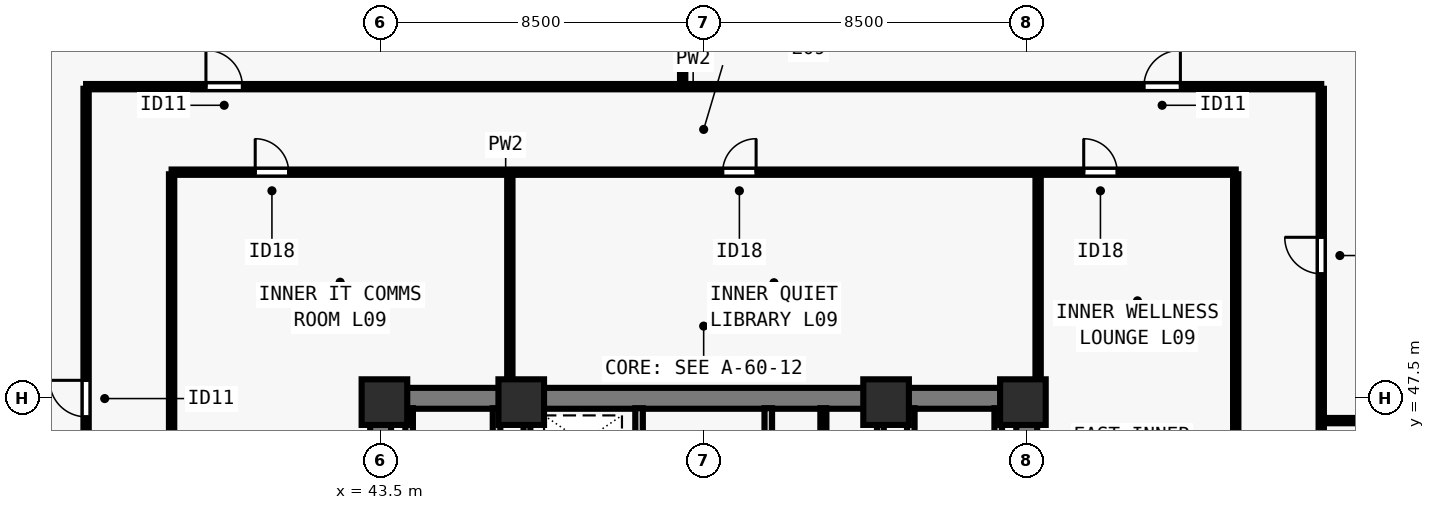
"""IFC4 building model, lengths in metres.
Left out: names, types, materials, properties, quantities, classifications, styles, units other than length and angle.
Written with IfcOpenShell. Run it as: python <this file> out.ifc"""

import sys

from ifc_helpers import new_model, si_unit, direction, frame, frame_2d, origin, origin_2d, place, context, subcontext, project, spatial, rectangle, extrude, element, fill, save


model = new_model("IFC4")
c1 = context("Model", 3, precision=1e-05, world=origin(), true_north=direction((0.0, 1.0)))
c2 = subcontext(c1, "Body", "Model", "MODEL_VIEW")
j1 = project(units=[si_unit("LENGTHUNIT", "METRE"), si_unit("PLANEANGLEUNIT", "RADIAN")], contexts=[c1])
p1 = place(None, origin())
s1 = spatial("IfcSite", under=j1, at=p1, CompositionType="ELEMENT")
p2 = place(p1, origin())
s2 = spatial("IfcBuilding", under=s1, at=p2, CompositionType="ELEMENT")
p3 = place(p2, frame((0.0, 0.0, 37.5)))
s3 = spatial("IfcBuildingStorey", under=s2, at=p3, CompositionType="ELEMENT", Elevation=37.5)
for number, where, z_axis, x_axis in (
    (1, (43.6, 47.4, 0.0), (0.0, 0.0, 1.0), (1.0, 0.0, 0.0)),
    (2, (47.2, 47.4, 0.0), (0.0, 0.0, 1.0), (1.0, 0.0, 0.0)),
    (3, (56.8, 47.4, 0.0), (0.0, 0.0, 1.0), (1.0, 0.0, 0.0)),
    (4, (60.4, 47.4, 0.0), (0.0, 0.0, 1.0), (1.0, 0.0, 0.0)),
):
    element("IfcColumn", number, at=place(p3, frame(where, z_axis=z_axis, x_axis=x_axis)), inside=s3, PredefinedType="COLUMN", context=c2, shape_type="SweptSolid", body=[
        extrude(rectangle(XDim=1.2, YDim=1.2, at=origin_2d()), origin(), (0.0, 0.0, 1.0), 3.5),
    ])
p4 = place(p3, frame((43.225, 47.5, 0.0), z_axis=(0.0, 0.0, 1.0), x_axis=(1.0, 0.0, 0.0)))
e5 = element("IfcWall", 5, at=p4, inside=s3, PredefinedType="SHEAR", context=c2, shape_type="SweptSolid", body=[
    extrude(rectangle(XDim=17.55, YDim=0.55, at=frame_2d((8.775, 0.0))), origin(), (0.0, 0.0, 1.0), 3.28),
])
for number, where, z_axis, x_axis in (
    (6, (43.5, 40.8, 0.0), (0.0, 0.0, 1.0), (0.0, 1.0, 0.0)),
    (7, (60.5, 40.8, 0.0), (0.0, 0.0, 1.0), (0.0, 1.0, 0.0)),
):
    element("IfcWall", number, at=place(p3, frame(where, z_axis=z_axis, x_axis=x_axis)), inside=s3, PredefinedType="SHEAR", context=c2, shape_type="SweptSolid", body=[
        extrude(rectangle(XDim=6.435, YDim=0.55, at=frame_2d((3.218, 0.0))), origin(), (0.0, 0.0, 1.0), 3.28),
    ])
p5 = place(p3, frame((50.3, 40.585, 0.0), z_axis=(0.0, 0.0, 1.0), x_axis=(0.0, 1.0, 0.0)))
e8 = element("IfcWall", 8, at=p5, inside=s3, PredefinedType="SOLIDWALL", context=c2, shape_type="SweptSolid", body=[
    extrude(rectangle(XDim=6.655, YDim=0.2, at=frame_2d((3.328, 0.0))), origin(), (0.0, 0.0, 1.0), 3.28),
])
p6 = place(p5, frame((5.065, 0.0, 0.0)))
e9 = element("IfcOpeningElement", 9, at=p6, cuts=e8, PredefinedType="OPENING", context=c2, shape_type="SweptSolid", body=[
    extrude(rectangle(XDim=0.8, YDim=2.08, at=frame_2d((0.4, 1.04))), frame((0.0, 0.11, 0.0), z_axis=(0.0, -1.0, 0.0), x_axis=(1.0, 0.0, 0.0)), (0.0, 0.0, 1.0), 0.22),
])
p7 = place(p3, frame((53.7, 40.585, 0.0), z_axis=(0.0, 0.0, 1.0), x_axis=(0.0, 1.0, 0.0)))
e10 = element("IfcWall", 10, at=p7, inside=s3, PredefinedType="SOLIDWALL", context=c2, shape_type="SweptSolid", body=[
    extrude(rectangle(XDim=6.655, YDim=0.2, at=frame_2d((3.328, 0.0))), origin(), (0.0, 0.0, 1.0), 3.28),
])
p8 = place(p7, frame((0.195, 0.0, 0.0)))
e11 = element("IfcOpeningElement", 11, at=p8, cuts=e10, PredefinedType="OPENING", context=c2, shape_type="SweptSolid", body=[
    extrude(rectangle(XDim=0.8, YDim=2.08, at=frame_2d((0.4, 1.04))), frame((0.0, 0.11, 0.0), z_axis=(0.0, -1.0, 0.0), x_axis=(1.0, 0.0, 0.0)), (0.0, 0.0, 1.0), 0.22),
])
p9 = place(p7, frame((4.265, 0.0, 0.0)))
e12 = element("IfcOpeningElement", 12, at=p9, cuts=e10, PredefinedType="OPENING", context=c2, shape_type="SweptSolid", body=[
    extrude(rectangle(XDim=0.95, YDim=2.12, at=frame_2d((0.475, 1.06))), frame((0.0, 0.11, 0.0), z_axis=(0.0, -1.0, 0.0), x_axis=(1.0, 0.0, 0.0)), (0.0, 0.0, 1.0), 0.22),
])
for number, where, z_axis, x_axis in (
    (13, (46.55, 43.735, 0.0), (0.0, 0.0, 1.0), (0.0, 1.0, 0.0)),
    (14, (44.25, 43.735, 0.0), (0.0, 0.0, 1.0), (0.0, 1.0, 0.0)),
    (15, (57.45, 43.735, 0.0), (0.0, 0.0, 1.0), (0.0, 1.0, 0.0)),
    (16, (59.75, 43.735, 0.0), (0.0, 0.0, 1.0), (0.0, 1.0, 0.0)),
):
    element("IfcWall", number, at=place(p3, frame(where, z_axis=z_axis, x_axis=x_axis)), inside=s3, PredefinedType="SOLIDWALL", context=c2, shape_type="SweptSolid", body=[
        extrude(rectangle(XDim=3.505, YDim=0.2, at=frame_2d((1.752, 0.0))), origin(), (0.0, 0.0, 1.0), 3.28),
    ])
for number, where, z_axis, x_axis in (
    (17, (47.35, 43.735, 0.0), (0.0, 0.0, 1.0), (0.0, 1.0, 0.0)),
    (18, (56.65, 43.735, 0.0), (0.0, 0.0, 1.0), (0.0, 1.0, 0.0)),
):
    element("IfcWall", number, at=place(p3, frame(where, z_axis=z_axis, x_axis=x_axis)), inside=s3, PredefinedType="SOLIDWALL", context=c2, shape_type="SweptSolid", body=[
        extrude(rectangle(XDim=3.505, YDim=0.18, at=frame_2d((1.752, 0.0))), origin(), (0.0, 0.0, 1.0), 3.28),
    ])
p10 = place(p3, frame((55.15, 44.195, 0.0), z_axis=(0.0, 0.0, 1.0), x_axis=(0.0, 1.0, 0.0)))
e19 = element("IfcWall", 19, at=p10, inside=s3, PredefinedType="PARTITIONING", context=c2, shape_type="SweptSolid", body=[
    extrude(rectangle(XDim=3.045, YDim=0.16, at=frame_2d((1.522, 0.0))), origin(), (0.0, 0.0, 1.0), 3.28),
])
p11 = place(p10, frame((1.025, 0.0, 0.0)))
e20 = element("IfcOpeningElement", 20, at=p11, cuts=e19, PredefinedType="OPENING", context=c2, shape_type="SweptSolid", body=[
    extrude(rectangle(XDim=0.8, YDim=2.1, at=frame_2d((0.4, 1.05))), frame((0.0, 0.09, 0.0), z_axis=(0.0, -1.0, 0.0), x_axis=(1.0, 0.0, 0.0)), (0.0, 0.0, 1.0), 0.18),
])
p12 = place(p3, frame((35.75, 55.7, 0.0), z_axis=(0.0, 0.0, 1.0), x_axis=(1.0, 0.0, 0.0)))
e21 = element("IfcWall", 21, at=p12, inside=s3, PredefinedType="PARTITIONING", context=c2, shape_type="SweptSolid", body=[
    extrude(rectangle(XDim=32.5, YDim=0.14, at=frame_2d((16.25, 0.0))), origin(), (0.0, 0.0, 1.0), 3.28),
])
p13 = place(p12, frame((3.154, 0.0, 0.0)))
e22 = element("IfcOpeningElement", 22, at=p13, cuts=e21, PredefinedType="OPENING", context=c2, shape_type="SweptSolid", body=[
    extrude(rectangle(XDim=0.96, YDim=2.12, at=frame_2d((0.48, 1.06))), frame((0.0, 0.08, 0.0), z_axis=(0.0, -1.0, 0.0), x_axis=(1.0, 0.0, 0.0)), (0.0, 0.0, 1.0), 0.16),
])
p14 = place(p12, frame((27.834, 0.0, 0.0)))
e23 = element("IfcOpeningElement", 23, at=p14, cuts=e21, PredefinedType="OPENING", context=c2, shape_type="SweptSolid", body=[
    extrude(rectangle(XDim=0.96, YDim=2.12, at=frame_2d((0.48, 1.06))), frame((0.0, 0.08, 0.0), z_axis=(0.0, -1.0, 0.0), x_axis=(1.0, 0.0, 0.0)), (0.0, 0.0, 1.0), 0.16),
])
p15 = place(p3, frame((35.75, 22.355, 0.0), z_axis=(0.0, 0.0, 1.0), x_axis=(0.0, 1.0, 0.0)))
e24 = element("IfcWall", 24, at=p15, inside=s3, PredefinedType="PARTITIONING", context=c2, shape_type="SweptSolid", body=[
    extrude(rectangle(XDim=33.29, YDim=0.14, at=frame_2d((16.645, 0.0))), origin(), (0.0, 0.0, 1.0), 3.28),
])
p16 = place(p15, frame((8.058, 0.0, 0.0)))
e25 = element("IfcOpeningElement", 25, at=p16, cuts=e24, PredefinedType="OPENING", context=c2, shape_type="SweptSolid", body=[
    extrude(rectangle(XDim=0.96, YDim=2.12, at=frame_2d((0.48, 1.06))), frame((0.0, 0.08, 0.0), z_axis=(0.0, -1.0, 0.0), x_axis=(1.0, 0.0, 0.0)), (0.0, 0.0, 1.0), 0.16),
])
p17 = place(p15, frame((24.658, 0.0, 0.0)))
e26 = element("IfcOpeningElement", 26, at=p17, cuts=e24, PredefinedType="OPENING", context=c2, shape_type="SweptSolid", body=[
    extrude(rectangle(XDim=0.96, YDim=2.12, at=frame_2d((0.48, 1.06))), frame((0.0, 0.08, 0.0), z_axis=(0.0, -1.0, 0.0), x_axis=(1.0, 0.0, 0.0)), (0.0, 0.0, 1.0), 0.16),
])
p18 = place(p3, frame((68.25, 22.355, 0.0), z_axis=(0.0, 0.0, 1.0), x_axis=(0.0, 1.0, 0.0)))
e27 = element("IfcWall", 27, at=p18, inside=s3, PredefinedType="PARTITIONING", context=c2, shape_type="SweptSolid", body=[
    extrude(rectangle(XDim=33.29, YDim=0.14, at=frame_2d((16.645, 0.0))), origin(), (0.0, 0.0, 1.0), 3.28),
])
p19 = place(p18, frame((3.522, 0.0, 0.0)))
e28 = element("IfcOpeningElement", 28, at=p19, cuts=e27, PredefinedType="OPENING", context=c2, shape_type="SweptSolid", body=[
    extrude(rectangle(XDim=0.96, YDim=2.12, at=frame_2d((0.48, 1.06))), frame((0.0, 0.08, 0.0), z_axis=(0.0, -1.0, 0.0), x_axis=(1.0, 0.0, 0.0)), (0.0, 0.0, 1.0), 0.16),
])
p20 = place(p18, frame((11.956, 0.0, 0.0)))
e29 = element("IfcOpeningElement", 29, at=p20, cuts=e27, PredefinedType="OPENING", context=c2, shape_type="SweptSolid", body=[
    extrude(rectangle(XDim=0.96, YDim=2.12, at=frame_2d((0.48, 1.06))), frame((0.0, 0.08, 0.0), z_axis=(0.0, -1.0, 0.0), x_axis=(1.0, 0.0, 0.0)), (0.0, 0.0, 1.0), 0.16),
])
p21 = place(p18, frame((20.256, 0.0, 0.0)))
e30 = element("IfcOpeningElement", 30, at=p21, cuts=e27, PredefinedType="OPENING", context=c2, shape_type="SweptSolid", body=[
    extrude(rectangle(XDim=0.96, YDim=2.12, at=frame_2d((0.48, 1.06))), frame((0.0, 0.08, 0.0), z_axis=(0.0, -1.0, 0.0), x_axis=(1.0, 0.0, 0.0)), (0.0, 0.0, 1.0), 0.16),
])
p22 = place(p18, frame((28.422, 0.0, 0.0)))
e31 = element("IfcOpeningElement", 31, at=p22, cuts=e27, PredefinedType="OPENING", context=c2, shape_type="SweptSolid", body=[
    extrude(rectangle(XDim=0.96, YDim=2.12, at=frame_2d((0.48, 1.06))), frame((0.0, 0.08, 0.0), z_axis=(0.0, -1.0, 0.0), x_axis=(1.0, 0.0, 0.0)), (0.0, 0.0, 1.0), 0.16),
])
p23 = place(p3, frame((38.0, 53.45, 0.0), z_axis=(0.0, 0.0, 1.0), x_axis=(1.0, 0.0, 0.0)))
e32 = element("IfcWall", 32, at=p23, inside=s3, PredefinedType="PARTITIONING", context=c2, shape_type="SweptSolid", body=[
    extrude(rectangle(XDim=28.0, YDim=0.14, at=frame_2d((14.0, 0.0))), origin(), (0.0, 0.0, 1.0), 3.28),
])
p24 = place(p23, frame((2.2, 0.0, 0.0)))
e33 = element("IfcOpeningElement", 33, at=p24, cuts=e32, PredefinedType="OPENING", context=c2, shape_type="SweptSolid", body=[
    extrude(rectangle(XDim=0.88, YDim=2.1, at=frame_2d((0.44, 1.05))), frame((0.0, 0.08, 0.0), z_axis=(0.0, -1.0, 0.0), x_axis=(1.0, 0.0, 0.0)), (0.0, 0.0, 1.0), 0.16),
])
p25 = place(p23, frame((14.5, 0.0, 0.0)))
e34 = element("IfcOpeningElement", 34, at=p25, cuts=e32, PredefinedType="OPENING", context=c2, shape_type="SweptSolid", body=[
    extrude(rectangle(XDim=0.88, YDim=2.1, at=frame_2d((0.44, 1.05))), frame((0.0, 0.08, 0.0), z_axis=(0.0, -1.0, 0.0), x_axis=(1.0, 0.0, 0.0)), (0.0, 0.0, 1.0), 0.16),
])
p26 = place(p23, frame((24.0, 0.0, 0.0)))
e35 = element("IfcOpeningElement", 35, at=p26, cuts=e32, PredefinedType="OPENING", context=c2, shape_type="SweptSolid", body=[
    extrude(rectangle(XDim=0.88, YDim=2.1, at=frame_2d((0.44, 1.05))), frame((0.0, 0.08, 0.0), z_axis=(0.0, -1.0, 0.0), x_axis=(1.0, 0.0, 0.0)), (0.0, 0.0, 1.0), 0.16),
])
p27 = place(p3, frame((38.0, 40.8, 0.0), z_axis=(0.0, 0.0, 1.0), x_axis=(0.0, 1.0, 0.0)))
e36 = element("IfcWall", 36, at=p27, inside=s3, PredefinedType="PARTITIONING", context=c2, shape_type="SweptSolid", body=[
    extrude(rectangle(XDim=12.595, YDim=0.14, at=frame_2d((6.297, 0.0))), origin(), (0.0, 0.0, 1.0), 3.28),
])
p28 = place(p27, frame((2.5, 0.0, 0.0)))
e37 = element("IfcOpeningElement", 37, at=p28, cuts=e36, PredefinedType="OPENING", context=c2, shape_type="SweptSolid", body=[
    extrude(rectangle(XDim=0.88, YDim=2.1, at=frame_2d((0.44, 1.05))), frame((0.0, 0.08, 0.0), z_axis=(0.0, -1.0, 0.0), x_axis=(1.0, 0.0, 0.0)), (0.0, 0.0, 1.0), 0.16),
])
p29 = place(p3, frame((66.0, 40.8, 0.0), z_axis=(0.0, 0.0, 1.0), x_axis=(0.0, 1.0, 0.0)))
e38 = element("IfcWall", 38, at=p29, inside=s3, PredefinedType="PARTITIONING", context=c2, shape_type="SweptSolid", body=[
    extrude(rectangle(XDim=12.595, YDim=0.14, at=frame_2d((6.297, 0.0))), origin(), (0.0, 0.0, 1.0), 3.28),
])
p30 = place(p29, frame((2.5, 0.0, 0.0)))
e39 = element("IfcOpeningElement", 39, at=p30, cuts=e38, PredefinedType="OPENING", context=c2, shape_type="SweptSolid", body=[
    extrude(rectangle(XDim=0.88, YDim=2.1, at=frame_2d((0.44, 1.05))), frame((0.0, 0.08, 0.0), z_axis=(0.0, -1.0, 0.0), x_axis=(1.0, 0.0, 0.0)), (0.0, 0.0, 1.0), 0.16),
])
p31 = place(p3, frame((46.9, 47.76, 0.0), z_axis=(0.0, 0.0, 1.0), x_axis=(0.0, 1.0, 0.0)))
e40 = element("IfcWall", 40, at=p31, inside=s3, PredefinedType="PARTITIONING", context=c2, shape_type="SweptSolid", body=[
    extrude(rectangle(XDim=5.635, YDim=0.14, at=frame_2d((2.817, 0.0))), origin(), (0.0, 0.0, 1.0), 3.28),
])
p32 = place(p3, frame((60.8, 47.76, 0.0), z_axis=(0.0, 0.0, 1.0), x_axis=(0.0, 1.0, 0.0)))
e41 = element("IfcWall", 41, at=p32, inside=s3, PredefinedType="PARTITIONING", context=c2, shape_type="SweptSolid", body=[
    extrude(rectangle(XDim=5.635, YDim=0.14, at=frame_2d((2.817, 0.0))), origin(), (0.0, 0.0, 1.0), 2.439),
])
p33 = place(p3, frame((51.448, 55.8, 0.0), z_axis=(0.0, 0.0, 1.0), x_axis=(0.0, 1.0, 0.0)))
e42 = element("IfcWall", 42, at=p33, inside=s3, PredefinedType="PARTITIONING", context=c2, shape_type="SweptSolid", body=[
    extrude(rectangle(XDim=8.28, YDim=0.14, at=frame_2d((4.14, 0.0))), origin(), (0.0, 0.0, 1.0), 3.28),
])
p34 = place(p3, frame((68.35, 46.913, 0.0), z_axis=(0.0, 0.0, 1.0), x_axis=(1.0, 0.0, 0.0)))
e43 = element("IfcWall", 43, at=p34, inside=s3, PredefinedType="PARTITIONING", context=c2, shape_type="SweptSolid", body=[
    extrude(rectangle(XDim=8.73, YDim=0.14, at=frame_2d((4.365, 0.0))), origin(), (0.0, 0.0, 1.0), 3.28),
])
p35 = place(p24, origin())
e44 = element("IfcDoor", 44, at=p35, inside=s3, OperationType="SINGLE_SWING_LEFT", PredefinedType="DOOR", context=c2, shape_type="SweptSolid", body=[
    extrude(rectangle(XDim=0.88, YDim=2.1, at=frame_2d((0.44, 1.05))), frame((0.0, 0.025, 0.0), z_axis=(0.0, -1.0, 0.0), x_axis=(1.0, 0.0, 0.0)), (0.0, 0.0, 1.0), 0.05),
])
fill(e33, e44)
p36 = place(p25, origin())
e45 = element("IfcDoor", 45, at=p36, inside=s3, OperationType="SINGLE_SWING_RIGHT", PredefinedType="DOOR", context=c2, shape_type="SweptSolid", body=[
    extrude(rectangle(XDim=0.88, YDim=2.1, at=frame_2d((0.44, 1.05))), frame((0.0, 0.025, 0.0), z_axis=(0.0, -1.0, 0.0), x_axis=(1.0, 0.0, 0.0)), (0.0, 0.0, 1.0), 0.05),
])
fill(e34, e45)
p37 = place(p26, origin())
e46 = element("IfcDoor", 46, at=p37, inside=s3, OperationType="SINGLE_SWING_LEFT", PredefinedType="DOOR", context=c2, shape_type="SweptSolid", body=[
    extrude(rectangle(XDim=0.88, YDim=2.1, at=frame_2d((0.44, 1.05))), frame((0.0, 0.025, 0.0), z_axis=(0.0, -1.0, 0.0), x_axis=(1.0, 0.0, 0.0)), (0.0, 0.0, 1.0), 0.05),
])
fill(e35, e46)
p38 = place(p13, origin())
e47 = element("IfcDoor", 47, at=p38, inside=s3, OperationType="SINGLE_SWING_LEFT", PredefinedType="DOOR", context=c2, shape_type="SweptSolid", body=[
    extrude(rectangle(XDim=0.96, YDim=2.12, at=frame_2d((0.48, 1.06))), frame((0.0, 0.025, 0.0), z_axis=(0.0, -1.0, 0.0), x_axis=(1.0, 0.0, 0.0)), (0.0, 0.0, 1.0), 0.05),
])
fill(e22, e47)
p39 = place(p14, origin())
e48 = element("IfcDoor", 48, at=p39, inside=s3, OperationType="SINGLE_SWING_RIGHT", PredefinedType="DOOR", context=c2, shape_type="SweptSolid", body=[
    extrude(rectangle(XDim=0.96, YDim=2.12, at=frame_2d((0.48, 1.06))), frame((0.0, 0.025, 0.0), z_axis=(0.0, -1.0, 0.0), x_axis=(1.0, 0.0, 0.0)), (0.0, 0.0, 1.0), 0.05),
])
fill(e23, e48)
p40 = place(p17, origin())
e49 = element("IfcDoor", 49, at=p40, inside=s3, OperationType="SINGLE_SWING_RIGHT", PredefinedType="DOOR", context=c2, shape_type="SweptSolid", body=[
    extrude(rectangle(XDim=0.96, YDim=2.12, at=frame_2d((0.48, 1.06))), frame((0.0, 0.025, 0.0), z_axis=(0.0, -1.0, 0.0), x_axis=(1.0, 0.0, 0.0)), (0.0, 0.0, 1.0), 0.05),
])
fill(e26, e49)
p41 = place(p22, origin())
e50 = element("IfcDoor", 50, at=p41, inside=s3, OperationType="SINGLE_SWING_RIGHT", PredefinedType="DOOR", context=c2, shape_type="SweptSolid", body=[
    extrude(rectangle(XDim=0.96, YDim=2.12, at=frame_2d((0.48, 1.06))), frame((0.0, 0.025, 0.0), z_axis=(0.0, -1.0, 0.0), x_axis=(1.0, 0.0, 0.0)), (0.0, 0.0, 1.0), 0.05),
])
fill(e31, e50)
save(model, sys.argv[1])
